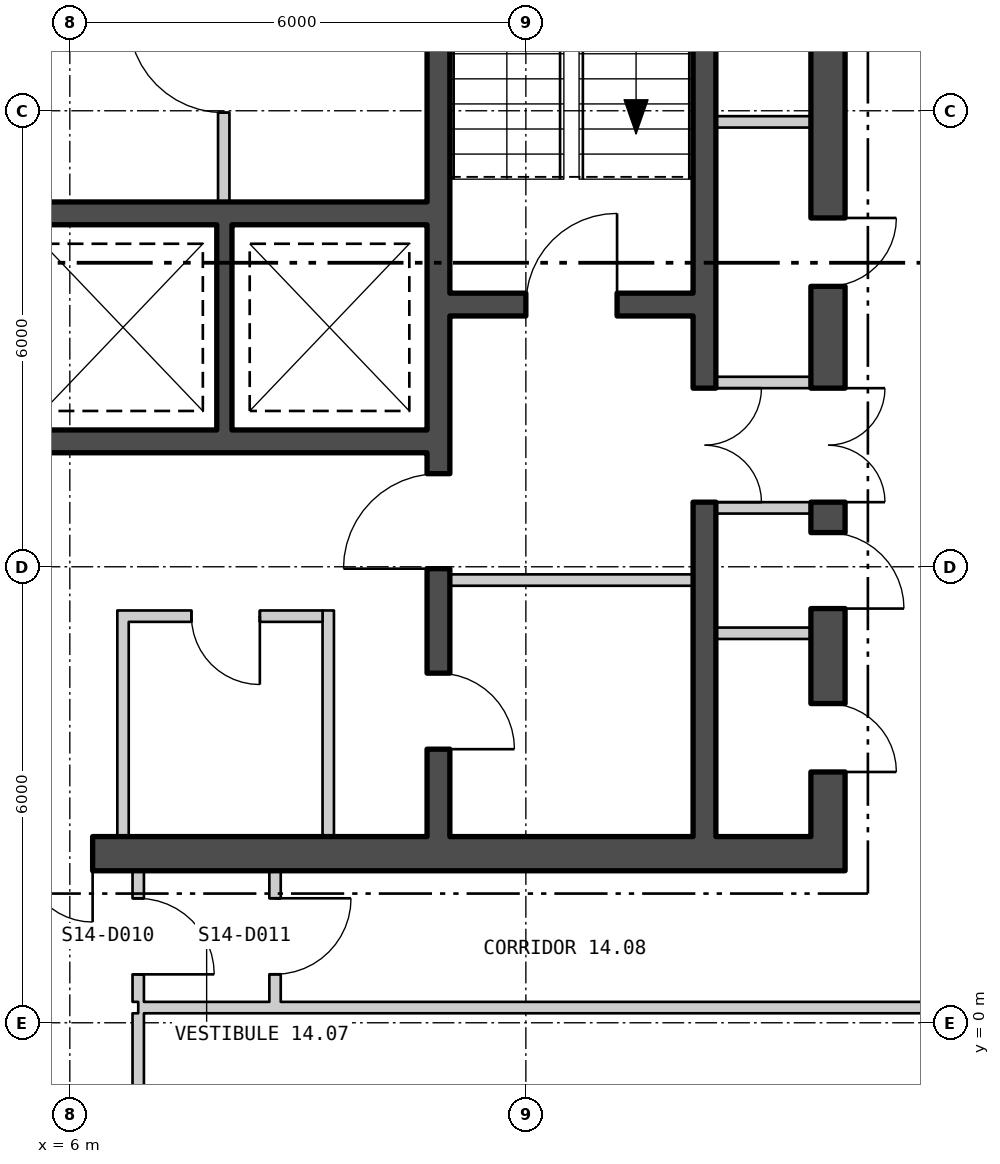
"""IFC4 building model, lengths in metres.
Left out: names, types, materials, properties, quantities, classifications, styles, units other than length and angle.
Written with IfcOpenShell. Run it as: python <this file> out.ifc"""

import sys

from ifc_helpers import new_model, si_unit, direction, frame, frame_2d, origin, place, context, subcontext, project, spatial, polyline, rectangle, outline, extrude, element, fill, save


model = new_model("IFC4")
c1 = context("Model", 3, precision=1e-05, world=origin(), true_north=direction((0.0, 1.0)))
c2 = subcontext(c1, "Body", "Model", "MODEL_VIEW")
j1 = project(units=[si_unit("LENGTHUNIT", "METRE"), si_unit("PLANEANGLEUNIT", "RADIAN")], contexts=[c1])
p1 = place(None, origin())
s1 = spatial("IfcSite", under=j1, at=p1, CompositionType="ELEMENT")
p2 = place(p1, origin())
s2 = spatial("IfcBuilding", under=s1, at=p2, CompositionType="ELEMENT")
p3 = place(p2, frame((0.0, 0.0, 192.6)))
s3 = spatial("IfcBuildingStorey", under=s2, at=p3, CompositionType="ELEMENT", Elevation=192.6)
p4 = place(p3, frame((3.67, -25.994, -0.18), z_axis=(0.0, 0.0, 1.0), x_axis=(0.499999764979, 0.866025539474, 0.0)))
e1 = element("IfcWall", 1, at=p4, inside=s3, PredefinedType="SOLIDWALL", context=c2, shape_type="SweptSolid", body=[
    extrude(outline(polyline([(-0.13, -0.225), (45.87, -0.225), (45.61, 0.225), (0.13, 0.225), (-0.13, -0.225)])), origin(), (0.0, 0.0, 1.0), 3.68),
])
p5 = place(p4, frame((1.424, 0.0, 1.08)))
e2 = element("IfcOpeningElement", 2, at=p5, cuts=e1, PredefinedType="OPENING", context=c2, shape_type="SweptSolid", body=[
    extrude(rectangle(XDim=2.4, YDim=2.0, at=frame_2d((1.2, 1.0))), frame((0.0, 0.235, 0.0), z_axis=(0.0, -1.0, 0.0), x_axis=(1.0, 0.0, 0.0)), (0.0, 0.0, 1.0), 0.47),
])
p6 = place(p4, frame((5.893, 0.0, 1.08)))
e3 = element("IfcOpeningElement", 3, at=p6, cuts=e1, PredefinedType="OPENING", context=c2, shape_type="SweptSolid", body=[
    extrude(rectangle(XDim=2.4, YDim=2.0, at=frame_2d((1.2, 1.0))), frame((0.0, 0.235, 0.0), z_axis=(0.0, -1.0, 0.0), x_axis=(1.0, 0.0, 0.0)), (0.0, 0.0, 1.0), 0.47),
])
p7 = place(p4, frame((10.401, 0.0, 1.08)))
e4 = element("IfcOpeningElement", 4, at=p7, cuts=e1, PredefinedType="OPENING", context=c2, shape_type="SweptSolid", body=[
    extrude(rectangle(XDim=2.4, YDim=2.0, at=frame_2d((1.2, 1.0))), frame((0.0, 0.235, 0.0), z_axis=(0.0, -1.0, 0.0), x_axis=(1.0, 0.0, 0.0)), (0.0, 0.0, 1.0), 0.47),
])
p8 = place(p4, frame((14.909, 0.0, 1.08)))
e5 = element("IfcOpeningElement", 5, at=p8, cuts=e1, PredefinedType="OPENING", context=c2, shape_type="SweptSolid", body=[
    extrude(rectangle(XDim=2.4, YDim=2.0, at=frame_2d((1.2, 1.0))), frame((0.0, 0.235, 0.0), z_axis=(0.0, -1.0, 0.0), x_axis=(1.0, 0.0, 0.0)), (0.0, 0.0, 1.0), 0.47),
])
p9 = place(p4, frame((19.416, 0.0, 1.08)))
e6 = element("IfcOpeningElement", 6, at=p9, cuts=e1, PredefinedType="OPENING", context=c2, shape_type="SweptSolid", body=[
    extrude(rectangle(XDim=2.4, YDim=2.0, at=frame_2d((1.2, 1.0))), frame((0.0, 0.235, 0.0), z_axis=(0.0, -1.0, 0.0), x_axis=(1.0, 0.0, 0.0)), (0.0, 0.0, 1.0), 0.47),
])
p10 = place(p4, frame((23.924, 0.0, 1.08)))
e7 = element("IfcOpeningElement", 7, at=p10, cuts=e1, PredefinedType="OPENING", context=c2, shape_type="SweptSolid", body=[
    extrude(rectangle(XDim=2.4, YDim=2.0, at=frame_2d((1.2, 1.0))), frame((0.0, 0.235, 0.0), z_axis=(0.0, -1.0, 0.0), x_axis=(1.0, 0.0, 0.0)), (0.0, 0.0, 1.0), 0.47),
])
p11 = place(p4, frame((28.431, 0.0, 1.08)))
e8 = element("IfcOpeningElement", 8, at=p11, cuts=e1, PredefinedType="OPENING", context=c2, shape_type="SweptSolid", body=[
    extrude(rectangle(XDim=2.4, YDim=2.0, at=frame_2d((1.2, 1.0))), frame((0.0, 0.235, 0.0), z_axis=(0.0, -1.0, 0.0), x_axis=(1.0, 0.0, 0.0)), (0.0, 0.0, 1.0), 0.47),
])
p12 = place(p4, frame((32.939, 0.0, 1.08)))
e9 = element("IfcOpeningElement", 9, at=p12, cuts=e1, PredefinedType="OPENING", context=c2, shape_type="SweptSolid", body=[
    extrude(rectangle(XDim=2.4, YDim=2.0, at=frame_2d((1.2, 1.0))), frame((0.0, 0.235, 0.0), z_axis=(0.0, -1.0, 0.0), x_axis=(1.0, 0.0, 0.0)), (0.0, 0.0, 1.0), 0.47),
])
p13 = place(p4, frame((37.447, 0.0, 1.08)))
e10 = element("IfcOpeningElement", 10, at=p13, cuts=e1, PredefinedType="OPENING", context=c2, shape_type="SweptSolid", body=[
    extrude(rectangle(XDim=2.4, YDim=2.0, at=frame_2d((1.2, 1.0))), frame((0.0, 0.235, 0.0), z_axis=(0.0, -1.0, 0.0), x_axis=(1.0, 0.0, 0.0)), (0.0, 0.0, 1.0), 0.47),
])
p14 = place(p4, frame((41.916, 0.0, 1.08)))
e11 = element("IfcOpeningElement", 11, at=p14, cuts=e1, PredefinedType="OPENING", context=c2, shape_type="SweptSolid", body=[
    extrude(rectangle(XDim=2.4, YDim=2.0, at=frame_2d((1.2, 1.0))), frame((0.0, 0.235, 0.0), z_axis=(0.0, -1.0, 0.0), x_axis=(1.0, 0.0, 0.0)), (0.0, 0.0, 1.0), 0.47),
])
p15 = place(p3, frame((-16.2, 2.225, 0.0), z_axis=(0.0, 0.0, 1.0), x_axis=(1.0, 0.0, 0.0)))
e12 = element("IfcWall", 12, at=p15, inside=s3, PredefinedType="SHEAR", context=c2, shape_type="SweptSolid", body=[
    extrude(rectangle(XDim=32.4, YDim=0.45, at=frame_2d((16.2, 0.0))), origin(), (0.0, 0.0, 1.0), 3.7),
])
p16 = place(p15, frame((10.7, 0.0, 0.0)))
e13 = element("IfcOpeningElement", 13, at=p16, cuts=e12, PredefinedType="OPENING", context=c2, shape_type="SweptSolid", body=[
    extrude(rectangle(XDim=1.8, YDim=2.4, at=frame_2d((0.9, 1.2))), frame((0.0, 0.235, 0.0), z_axis=(0.0, -1.0, 0.0), x_axis=(1.0, 0.0, 0.0)), (0.0, 0.0, 1.0), 0.47),
])
p17 = place(p15, frame((20.7, 0.0, 0.0)))
e14 = element("IfcOpeningElement", 14, at=p17, cuts=e12, PredefinedType="OPENING", context=c2, shape_type="SweptSolid", body=[
    extrude(rectangle(XDim=1.8, YDim=2.4, at=frame_2d((0.9, 1.2))), frame((0.0, 0.235, 0.0), z_axis=(0.0, -1.0, 0.0), x_axis=(1.0, 0.0, 0.0)), (0.0, 0.0, 1.0), 0.47),
])
p18 = place(p3, frame((15.975, 2.45, 0.0), z_axis=(0.0, 0.0, 1.0), x_axis=(0.0, 1.0, 0.0)))
e15 = element("IfcWall", 15, at=p18, inside=s3, PredefinedType="SHEAR", context=c2, shape_type="SweptSolid", body=[
    extrude(rectangle(XDim=15.1, YDim=0.45, at=frame_2d((7.55, 0.0))), origin(), (0.0, 0.0, 1.0), 3.7),
])
p19 = place(p18, frame((4.4, 0.0, 0.0)))
e16 = element("IfcOpeningElement", 16, at=p19, cuts=e15, PredefinedType="OPENING", context=c2, shape_type="SweptSolid", body=[
    extrude(rectangle(XDim=1.5, YDim=2.1, at=frame_2d((0.75, 1.05))), frame((0.0, 0.235, 0.0), z_axis=(0.0, -1.0, 0.0), x_axis=(1.0, 0.0, 0.0)), (0.0, 0.0, 1.0), 0.47),
])
p20 = place(p18, frame((0.85, 0.0, 0.0)))
e17 = element("IfcOpeningElement", 17, at=p20, cuts=e15, PredefinedType="OPENING", context=c2, shape_type="SweptSolid", body=[
    extrude(rectangle(XDim=0.9, YDim=2.1, at=frame_2d((0.45, 1.05))), frame((0.0, 0.235, 0.0), z_axis=(0.0, -1.0, 0.0), x_axis=(1.0, 0.0, 0.0)), (0.0, 0.0, 1.0), 0.47),
])
p21 = place(p18, frame((3.0, 0.0, 0.0)))
e18 = element("IfcOpeningElement", 18, at=p21, cuts=e15, PredefinedType="OPENING", context=c2, shape_type="SweptSolid", body=[
    extrude(rectangle(XDim=1.0, YDim=2.1, at=frame_2d((0.5, 1.05))), frame((0.0, 0.235, 0.0), z_axis=(0.0, -1.0, 0.0), x_axis=(1.0, 0.0, 0.0)), (0.0, 0.0, 1.0), 0.47),
])
p22 = place(p18, frame((7.239, 0.0, 0.0)))
e19 = element("IfcOpeningElement", 19, at=p22, cuts=e15, PredefinedType="OPENING", context=c2, shape_type="SweptSolid", body=[
    extrude(rectangle(XDim=0.9, YDim=2.1, at=frame_2d((0.45, 1.05))), frame((0.0, 0.235, 0.0), z_axis=(0.0, -1.0, 0.0), x_axis=(1.0, 0.0, 0.0)), (0.0, 0.0, 1.0), 0.47),
])
p23 = place(p18, frame((11.839, 0.0, 0.0)))
e20 = element("IfcOpeningElement", 20, at=p23, cuts=e15, PredefinedType="OPENING", context=c2, shape_type="SweptSolid", body=[
    extrude(rectangle(XDim=0.9, YDim=2.1, at=frame_2d((0.45, 1.05))), frame((0.0, 0.235, 0.0), z_axis=(0.0, -1.0, 0.0), x_axis=(1.0, 0.0, 0.0)), (0.0, 0.0, 1.0), 0.47),
])
p24 = place(p3, frame((10.85, 2.45, 0.0), z_axis=(0.0, 0.0, 1.0), x_axis=(0.0, 1.0, 0.0)))
e21 = element("IfcWall", 21, at=p24, inside=s3, PredefinedType="SHEAR", context=c2, shape_type="SweptSolid", body=[
    extrude(rectangle(XDim=15.1, YDim=0.3, at=frame_2d((7.55, 0.0))), origin(), (0.0, 0.0, 1.0), 3.7),
])
p25 = place(p24, frame((3.525, 0.0, 0.0)))
e22 = element("IfcOpeningElement", 22, at=p25, cuts=e21, PredefinedType="OPENING", context=c2, shape_type="SweptSolid", body=[
    extrude(rectangle(XDim=1.25, YDim=2.1, at=frame_2d((0.625, 1.05))), frame((0.0, 0.16, 0.0), z_axis=(0.0, -1.0, 0.0), x_axis=(1.0, 0.0, 0.0)), (0.0, 0.0, 1.0), 0.32),
])
p26 = place(p24, frame((1.15, 0.0, 0.0)))
e23 = element("IfcOpeningElement", 23, at=p26, cuts=e21, PredefinedType="OPENING", context=c2, shape_type="SweptSolid", body=[
    extrude(rectangle(XDim=1.0, YDim=2.1, at=frame_2d((0.5, 1.05))), frame((0.0, 0.16, 0.0), z_axis=(0.0, -1.0, 0.0), x_axis=(1.0, 0.0, 0.0)), (0.0, 0.0, 1.0), 0.32),
])
p27 = place(p3, frame((14.35, 2.45, 0.0), z_axis=(0.0, 0.0, 1.0), x_axis=(0.0, 1.0, 0.0)))
e24 = element("IfcWall", 24, at=p27, inside=s3, PredefinedType="SHEAR", context=c2, shape_type="SweptSolid", body=[
    extrude(rectangle(XDim=15.1, YDim=0.3, at=frame_2d((7.55, 0.0))), origin(), (0.0, 0.0, 1.0), 3.7),
])
p28 = place(p27, frame((4.4, 0.0, 0.0)))
e25 = element("IfcOpeningElement", 25, at=p28, cuts=e24, PredefinedType="OPENING", context=c2, shape_type="SweptSolid", body=[
    extrude(rectangle(XDim=1.5, YDim=2.1, at=frame_2d((0.75, 1.05))), frame((0.0, 0.16, 0.0), z_axis=(0.0, -1.0, 0.0), x_axis=(1.0, 0.0, 0.0)), (0.0, 0.0, 1.0), 0.32),
])
p29 = place(p3, frame((11.0, 9.45, 0.0), z_axis=(0.0, 0.0, 1.0), x_axis=(1.0, 0.0, 0.0)))
e26 = element("IfcWall", 26, at=p29, inside=s3, PredefinedType="SHEAR", context=c2, shape_type="SweptSolid", body=[
    extrude(rectangle(XDim=3.2, YDim=0.3, at=frame_2d((1.6, 0.0))), origin(), (0.0, 0.0, 1.0), 3.7),
])
p30 = place(p29, frame((1.0, 0.0, 0.0)))
e27 = element("IfcOpeningElement", 27, at=p30, cuts=e26, PredefinedType="OPENING", context=c2, shape_type="SweptSolid", body=[
    extrude(rectangle(XDim=1.2, YDim=2.1, at=frame_2d((0.6, 1.05))), frame((0.0, 0.16, 0.0), z_axis=(0.0, -1.0, 0.0), x_axis=(1.0, 0.0, 0.0)), (0.0, 0.0, 1.0), 0.32),
])
p31 = place(p3, frame((2.6, 10.65, 0.0), z_axis=(0.0, 0.0, 1.0), x_axis=(1.0, 0.0, 0.0)))
e28 = element("IfcWall", 28, at=p31, inside=s3, PredefinedType="SHEAR", context=c2, shape_type="SweptSolid", body=[
    extrude(rectangle(XDim=8.1, YDim=0.3, at=frame_2d((4.05, 0.0))), origin(), (0.0, 0.0, 1.0), 3.7),
])
p32 = place(p31, frame((0.933, 0.0, 0.0)))
e29 = element("IfcOpeningElement", 29, at=p32, cuts=e28, PredefinedType="OPENING", context=c2, shape_type="SweptSolid", body=[
    extrude(rectangle(XDim=1.0, YDim=2.1, at=frame_2d((0.5, 1.05))), frame((0.0, 0.16, 0.0), z_axis=(0.0, -1.0, 0.0), x_axis=(1.0, 0.0, 0.0)), (0.0, 0.0, 1.0), 0.32),
])
p33 = place(p3, frame((2.6, 7.65, 0.0), z_axis=(0.0, 0.0, 1.0), x_axis=(1.0, 0.0, 0.0)))
e30 = element("IfcWall", 30, at=p33, inside=s3, PredefinedType="SHEAR", context=c2, shape_type="SweptSolid", body=[
    extrude(rectangle(XDim=8.1, YDim=0.3, at=frame_2d((4.05, 0.0))), origin(), (0.0, 0.0, 1.0), 3.7),
])
p34 = place(p3, frame((8.033, 7.8, 0.0), z_axis=(0.0, 0.0, 1.0), x_axis=(0.0, 1.0, 0.0)))
e31 = element("IfcWall", 31, at=p34, inside=s3, PredefinedType="SHEAR", context=c2, shape_type="SweptSolid", body=[
    extrude(rectangle(XDim=2.7, YDim=0.2, at=frame_2d((1.35, 0.0))), origin(), (0.0, 0.0, 1.0), 3.7),
])
p35 = place(p3, frame((8.025, 10.8, 0.0), z_axis=(0.0, 0.0, 1.0), x_axis=(0.0, 1.0, 0.0)))
e32 = element("IfcWall", 32, at=p35, inside=s3, PredefinedType="PARTITIONING", context=c2, shape_type="SweptSolid", body=[
    extrude(rectangle(XDim=3.6, YDim=0.15, at=frame_2d((1.8, 0.0))), origin(), (0.0, 0.0, 1.0), 3.7),
])
p36 = place(p35, frame((1.175, 0.0, 0.0)))
e33 = element("IfcOpeningElement", 33, at=p36, cuts=e32, PredefinedType="OPENING", context=c2, shape_type="SweptSolid", body=[
    extrude(rectangle(XDim=1.25, YDim=2.1, at=frame_2d((0.625, 1.05))), frame((0.0, 0.085, 0.0), z_axis=(0.0, -1.0, 0.0), x_axis=(1.0, 0.0, 0.0)), (0.0, 0.0, 1.0), 0.17),
])
p37 = place(p3, frame((11.0, 5.825, 0.0), z_axis=(0.0, 0.0, 1.0), x_axis=(1.0, 0.0, 0.0)))
e34 = element("IfcWall", 34, at=p37, inside=s3, PredefinedType="PARTITIONING", context=c2, shape_type="SweptSolid", body=[
    extrude(rectangle(XDim=3.2, YDim=0.15, at=frame_2d((1.6, 0.0))), origin(), (0.0, 0.0, 1.0), 3.7),
])
for number, where, z_axis, x_axis in (
    (35, (14.5, 6.775, 0.0), (0.0, 0.0, 1.0), (1.0, 0.0, 0.0)),
    (36, (14.5, 8.425, 0.0), (0.0, 0.0, 1.0), (1.0, 0.0, 0.0)),
    (37, (14.5, 5.125, 0.0), (0.0, 0.0, 1.0), (1.0, 0.0, 0.0)),
    (38, (14.5, 11.854, 0.0), (0.0, 0.0, 1.0), (1.0, 0.0, 0.0)),
):
    element("IfcWall", number, at=place(p3, frame(where, z_axis=z_axis, x_axis=x_axis)), inside=s3, PredefinedType="PARTITIONING", context=c2, shape_type="SweptSolid", body=[
        extrude(rectangle(XDim=1.25, YDim=0.15, at=frame_2d((0.625, 0.0))), origin(), (0.0, 0.0, 1.0), 3.7),
    ])
for number, where, z_axis, x_axis in (
    (39, (6.7, 2.45, 0.0), (0.0, 0.0, 1.0), (0.0, 1.0, 0.0)),
    (40, (9.4, 2.45, 0.0), (0.0, 0.0, 1.0), (0.0, 1.0, 0.0)),
):
    element("IfcWall", number, at=place(p3, frame(where, z_axis=z_axis, x_axis=x_axis)), inside=s3, PredefinedType="PARTITIONING", context=c2, shape_type="SweptSolid", body=[
        extrude(rectangle(XDim=2.975, YDim=0.15, at=frame_2d((1.488, 0.0))), origin(), (0.0, 0.0, 1.0), 3.7),
    ])
p38 = place(p3, frame((6.775, 5.35, 0.0), z_axis=(0.0, 0.0, 1.0), x_axis=(1.0, 0.0, 0.0)))
e41 = element("IfcWall", 41, at=p38, inside=s3, PredefinedType="PARTITIONING", context=c2, shape_type="SweptSolid", body=[
    extrude(rectangle(XDim=2.55, YDim=0.15, at=frame_2d((1.275, 0.0))), origin(), (0.0, 0.0, 1.0), 3.7),
])
p39 = place(p38, frame((0.825, 0.0, 0.0)))
e42 = element("IfcOpeningElement", 42, at=p39, cuts=e41, PredefinedType="OPENING", context=c2, shape_type="SweptSolid", body=[
    extrude(rectangle(XDim=0.9, YDim=2.1, at=frame_2d((0.45, 1.05))), frame((0.0, 0.085, 0.0), z_axis=(0.0, -1.0, 0.0), x_axis=(1.0, 0.0, 0.0)), (0.0, 0.0, 1.0), 0.17),
])
p40 = place(p3, frame((6.9, -1.125, 0.0), z_axis=(0.0, 0.0, 1.0), x_axis=(0.0, 1.0, 0.0)))
e43 = element("IfcWall", 43, at=p40, inside=s3, PredefinedType="PARTITIONING", context=c2, shape_type="SweptSolid", body=[
    extrude(rectangle(XDim=1.25, YDim=0.15, at=frame_2d((0.625, 0.0))), origin(), (0.0, 0.0, 1.0), 3.7),
])
p41 = place(p3, frame((6.9, 0.2, 0.0), z_axis=(0.0, 0.0, 1.0), x_axis=(1.0, 0.0, 0.0)))
e44 = element("IfcWall", 44, at=p41, inside=s3, PredefinedType="PARTITIONING", context=c2, shape_type="SweptSolid", body=[
    extrude(rectangle(XDim=11.025, YDim=0.15, at=frame_2d((5.513, 0.0))), origin(), (0.0, 0.0, 1.0), 3.7),
])
p42 = place(p3, frame((6.9, 0.275, 0.0), z_axis=(0.0, 0.0, 1.0), x_axis=(0.0, 1.0, 0.0)))
e45 = element("IfcWall", 45, at=p42, inside=s3, PredefinedType="PARTITIONING", context=c2, shape_type="SweptSolid", body=[
    extrude(rectangle(XDim=1.725, YDim=0.15, at=frame_2d((0.863, 0.0))), origin(), (0.0, 0.0, 1.0), 3.7),
])
p43 = place(p42, frame((0.362, 0.0, 0.0)))
e46 = element("IfcOpeningElement", 46, at=p43, cuts=e45, PredefinedType="OPENING", context=c2, shape_type="SweptSolid", body=[
    extrude(rectangle(XDim=1.0, YDim=2.1, at=frame_2d((0.5, 1.05))), frame((0.0, 0.085, 0.0), z_axis=(0.0, -1.0, 0.0), x_axis=(1.0, 0.0, 0.0)), (0.0, 0.0, 1.0), 0.17),
])
p44 = place(p3, frame((8.7, 0.275, 0.0), z_axis=(0.0, 0.0, 1.0), x_axis=(0.0, 1.0, 0.0)))
e47 = element("IfcWall", 47, at=p44, inside=s3, PredefinedType="PARTITIONING", context=c2, shape_type="SweptSolid", body=[
    extrude(rectangle(XDim=1.725, YDim=0.15, at=frame_2d((0.863, 0.0))), origin(), (0.0, 0.0, 1.0), 3.7),
])
p45 = place(p44, frame((0.363, 0.0, 0.0)))
e48 = element("IfcOpeningElement", 48, at=p45, cuts=e47, PredefinedType="OPENING", context=c2, shape_type="SweptSolid", body=[
    extrude(rectangle(XDim=1.0, YDim=2.1, at=frame_2d((0.5, 1.05))), frame((0.0, 0.085, 0.0), z_axis=(0.0, -1.0, 0.0), x_axis=(1.0, 0.0, 0.0)), (0.0, 0.0, 1.0), 0.17),
])
p46 = place(p36, origin())
e49 = element("IfcDoor", 49, at=p46, inside=s3, OperationType="SINGLE_SWING_LEFT", PredefinedType="DOOR", context=c2, shape_type="SweptSolid", body=[
    extrude(rectangle(XDim=1.25, YDim=2.1, at=frame_2d((0.625, 1.05))), frame((0.0, 0.025, 0.0), z_axis=(0.0, -1.0, 0.0), x_axis=(1.0, 0.0, 0.0)), (0.0, 0.0, 1.0), 0.05),
])
fill(e33, e49)
p47 = place(p30, origin())
e50 = element("IfcDoor", 50, at=p47, inside=s3, OperationType="SINGLE_SWING_LEFT", PredefinedType="DOOR", context=c2, shape_type="SweptSolid", body=[
    extrude(rectangle(XDim=1.2, YDim=2.1, at=frame_2d((0.6, 1.05))), frame((0.0, 0.025, 0.0), z_axis=(0.0, -1.0, 0.0), x_axis=(1.0, 0.0, 0.0)), (0.0, 0.0, 1.0), 0.05),
])
fill(e27, e50)
p48 = place(p25, origin())
e51 = element("IfcDoor", 51, at=p48, inside=s3, OperationType="SINGLE_SWING_RIGHT", PredefinedType="DOOR", context=c2, shape_type="SweptSolid", body=[
    extrude(rectangle(XDim=1.25, YDim=2.1, at=frame_2d((0.625, 1.05))), frame((0.0, 0.025, 0.0), z_axis=(0.0, -1.0, 0.0), x_axis=(1.0, 0.0, 0.0)), (0.0, 0.0, 1.0), 0.05),
])
fill(e22, e51)
p49 = place(p26, origin())
e52 = element("IfcDoor", 52, at=p49, inside=s3, OperationType="SINGLE_SWING_LEFT", PredefinedType="DOOR", context=c2, shape_type="SweptSolid", body=[
    extrude(rectangle(XDim=1.0, YDim=2.1, at=frame_2d((0.5, 1.05))), frame((0.0, 0.025, 0.0), z_axis=(0.0, -1.0, 0.0), x_axis=(1.0, 0.0, 0.0)), (0.0, 0.0, 1.0), 0.05),
])
fill(e23, e52)
p50 = place(p28, origin())
e53 = element("IfcDoor", 53, at=p50, inside=s3, OperationType="DOUBLE_DOOR_SINGLE_SWING", PredefinedType="DOOR", context=c2, shape_type="SweptSolid", body=[
    extrude(rectangle(XDim=1.5, YDim=2.1, at=frame_2d((0.75, 1.05))), frame((0.0, 0.025, 0.0), z_axis=(0.0, -1.0, 0.0), x_axis=(1.0, 0.0, 0.0)), (0.0, 0.0, 1.0), 0.05),
])
fill(e25, e53)
p51 = place(p19, origin())
e54 = element("IfcDoor", 54, at=p51, inside=s3, OperationType="DOUBLE_DOOR_SINGLE_SWING", PredefinedType="DOOR", context=c2, shape_type="SweptSolid", body=[
    extrude(rectangle(XDim=1.5, YDim=2.1, at=frame_2d((0.75, 1.05))), frame((0.0, 0.025, 0.0), z_axis=(0.0, -1.0, 0.0), x_axis=(1.0, 0.0, 0.0)), (0.0, 0.0, 1.0), 0.05),
])
fill(e16, e54)
p52 = place(p20, origin())
e55 = element("IfcDoor", 55, at=p52, inside=s3, OperationType="SINGLE_SWING_LEFT", PredefinedType="DOOR", context=c2, shape_type="SweptSolid", body=[
    extrude(rectangle(XDim=0.9, YDim=2.1, at=frame_2d((0.45, 1.05))), frame((0.0, 0.025, 0.0), z_axis=(0.0, -1.0, 0.0), x_axis=(1.0, 0.0, 0.0)), (0.0, 0.0, 1.0), 0.05),
])
fill(e17, e55)
p53 = place(p21, origin())
e56 = element("IfcDoor", 56, at=p53, inside=s3, OperationType="SINGLE_SWING_LEFT", PredefinedType="DOOR", context=c2, shape_type="SweptSolid", body=[
    extrude(rectangle(XDim=1.0, YDim=2.1, at=frame_2d((0.5, 1.05))), frame((0.0, 0.025, 0.0), z_axis=(0.0, -1.0, 0.0), x_axis=(1.0, 0.0, 0.0)), (0.0, 0.0, 1.0), 0.05),
])
fill(e18, e56)
p54 = place(p22, origin())
e57 = element("IfcDoor", 57, at=p54, inside=s3, OperationType="SINGLE_SWING_RIGHT", PredefinedType="DOOR", context=c2, shape_type="SweptSolid", body=[
    extrude(rectangle(XDim=0.9, YDim=2.1, at=frame_2d((0.45, 1.05))), frame((0.0, 0.025, 0.0), z_axis=(0.0, -1.0, 0.0), x_axis=(1.0, 0.0, 0.0)), (0.0, 0.0, 1.0), 0.05),
])
fill(e19, e57)
p55 = place(p39, origin())
e58 = element("IfcDoor", 58, at=p55, inside=s3, OperationType="SINGLE_SWING_RIGHT", PredefinedType="DOOR", context=c2, shape_type="SweptSolid", body=[
    extrude(rectangle(XDim=0.9, YDim=2.1, at=frame_2d((0.45, 1.05))), frame((0.0, 0.025, 0.0), z_axis=(0.0, -1.0, 0.0), x_axis=(1.0, 0.0, 0.0)), (0.0, 0.0, 1.0), 0.05),
])
fill(e42, e58)
p56 = place(p17, origin())
e59 = element("IfcDoor", 59, at=p56, inside=s3, OperationType="DOUBLE_DOOR_SINGLE_SWING", PredefinedType="DOOR", context=c2, shape_type="SweptSolid", body=[
    extrude(rectangle(XDim=1.8, YDim=2.4, at=frame_2d((0.9, 1.2))), frame((0.0, 0.025, 0.0), z_axis=(0.0, -1.0, 0.0), x_axis=(1.0, 0.0, 0.0)), (0.0, 0.0, 1.0), 0.05),
])
fill(e14, e59)
p57 = place(p43, origin())
e60 = element("IfcDoor", 60, at=p57, inside=s3, OperationType="SINGLE_SWING_LEFT", PredefinedType="DOOR", context=c2, shape_type="SweptSolid", body=[
    extrude(rectangle(XDim=1.0, YDim=2.1, at=frame_2d((0.5, 1.05))), frame((0.0, 0.025, 0.0), z_axis=(0.0, -1.0, 0.0), x_axis=(1.0, 0.0, 0.0)), (0.0, 0.0, 1.0), 0.05),
])
fill(e46, e60)
p58 = place(p45, origin())
e61 = element("IfcDoor", 61, at=p58, inside=s3, OperationType="SINGLE_SWING_RIGHT", PredefinedType="DOOR", context=c2, shape_type="SweptSolid", body=[
    extrude(rectangle(XDim=1.0, YDim=2.1, at=frame_2d((0.5, 1.05))), frame((0.0, 0.025, 0.0), z_axis=(0.0, -1.0, 0.0), x_axis=(1.0, 0.0, 0.0)), (0.0, 0.0, 1.0), 0.05),
])
fill(e48, e61)
save(model, sys.argv[1])
